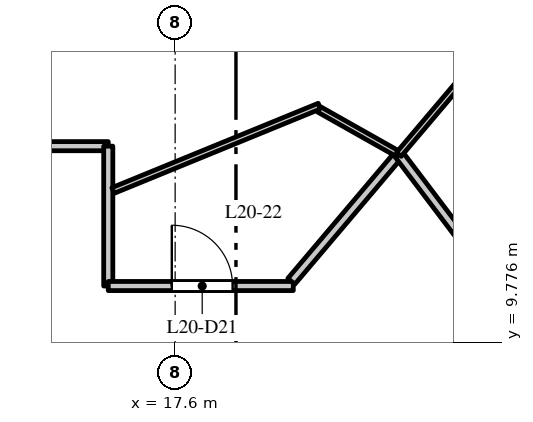
"""IFC4 building model, lengths in metres.
Left out: names, types, materials, properties, quantities, classifications, styles, units other than length and angle.
Written with IfcOpenShell. Run it as: python <this file> out.ifc"""

import sys

from ifc_helpers import new_model, si_unit, direction, frame, frame_2d, origin, place, context, subcontext, project, spatial, rectangle, extrude, element, fill, save


model = new_model("IFC4")
c1 = context("Model", 3, precision=1e-05, world=origin(), true_north=direction((0.0, 1.0)))
c2 = subcontext(c1, "Body", "Model", "MODEL_VIEW")
j1 = project(units=[si_unit("LENGTHUNIT", "METRE"), si_unit("PLANEANGLEUNIT", "RADIAN")], contexts=[c1])
p1 = place(None, origin())
s1 = spatial("IfcSite", under=j1, at=p1, CompositionType="ELEMENT")
p2 = place(p1, origin())
s2 = spatial("IfcBuilding", under=s1, at=p2, CompositionType="ELEMENT")
p3 = place(p2, frame((0.0, 0.0, 92.0)))
s3 = spatial("IfcBuildingStorey", under=s2, at=p3, CompositionType="ELEMENT", Elevation=92.0)
p4 = place(p3, frame((7.499, 13.0, 0.0), z_axis=(0.0, 0.0, 1.0), x_axis=(1.0, 0.0, 0.0)))
e1 = element("IfcWall", 1, at=p4, inside=s3, PredefinedType="PARTITIONING", context=c2, shape_type="SweptSolid", body=[
    extrude(rectangle(XDim=9.001, YDim=0.15, at=frame_2d((4.5, 0.0))), origin(), (0.0, 0.0, 1.0), 2.85),
])
p5 = place(p4, frame((4.101, 0.0, 0.0)))
e2 = element("IfcOpeningElement", 2, at=p5, cuts=e1, PredefinedType="OPENING", context=c2, shape_type="SweptSolid", body=[
    extrude(rectangle(XDim=1.0, YDim=2.1, at=frame_2d((0.5, 1.05))), frame((0.0, 0.085, 0.0), z_axis=(0.0, -1.0, 0.0), x_axis=(1.0, 0.0, 0.0)), (0.0, 0.0, 1.0), 0.17),
])
p6 = place(p3, frame((16.5, 10.7, 0.0), z_axis=(0.0, 0.0, 1.0), x_axis=(0.0, 1.0, 0.0)))
e3 = element("IfcWall", 3, at=p6, inside=s3, PredefinedType="PARTITIONING", context=c2, shape_type="SweptSolid", body=[
    extrude(rectangle(XDim=2.3, YDim=0.15, at=frame_2d((1.15, 0.0))), origin(), (0.0, 0.0, 1.0), 3.7),
])
p7 = place(p3, frame((16.5, 10.7, 0.0), z_axis=(0.0, 0.0, 1.0), x_axis=(1.0, 0.0, 0.0)))
e4 = element("IfcWall", 4, at=p7, inside=s3, PredefinedType="PARTITIONING", context=c2, shape_type="SweptSolid", body=[
    extrude(rectangle(XDim=3.043, YDim=0.15, at=frame_2d((1.521, 0.0))), origin(), (0.0, 0.0, 1.0), 3.7),
])
p8 = place(p7, frame((1.045, 0.0, 0.0)))
e5 = element("IfcOpeningElement", 5, at=p8, cuts=e4, PredefinedType="OPENING", context=c2, shape_type="SweptSolid", body=[
    extrude(rectangle(XDim=1.0, YDim=2.1, at=frame_2d((0.5, 1.05))), frame((0.0, 0.085, 0.0), z_axis=(0.0, -1.0, 0.0), x_axis=(1.0, 0.0, 0.0)), (0.0, 0.0, 1.0), 0.17),
])
p9 = place(p3, frame((16.579, 12.271, 0.0), z_axis=(0.0, 0.0, 1.0), x_axis=(0.925550138862, 0.378625065801, 0.0)))
e6 = element("IfcWall", 6, at=p9, inside=s3, PredefinedType="PARTITIONING", context=c2, shape_type="SweptSolid", body=[
    extrude(rectangle(XDim=3.666, YDim=0.1, at=frame_2d((1.833, 0.0))), origin(), (0.0, 0.0, 1.0), 3.7),
])
p10 = place(p3, frame((19.511, 10.778, 0.0), z_axis=(0.0, 0.0, 1.0), x_axis=(0.64641426768, 0.762986628021, 0.0)))
e7 = element("IfcWall", 7, at=p10, inside=s3, PredefinedType="PARTITIONING", context=c2, shape_type="SweptSolid", body=[
    extrude(rectangle(XDim=2.735, YDim=0.15, at=frame_2d((1.368, 0.0))), origin(), (0.0, 0.0, 1.0), 3.7),
])
p11 = place(p3, frame((19.969, 13.604, 0.0), z_axis=(0.0, 0.0, 1.0), x_axis=(0.870976686736, -0.491324344158, 0.0)))
e8 = element("IfcWall", 8, at=p11, inside=s3, PredefinedType="PARTITIONING", context=c2, shape_type="SweptSolid", body=[
    extrude(rectangle(XDim=1.504, YDim=0.1, at=frame_2d((0.752, 0.0))), origin(), (0.0, 0.0, 1.0), 3.7),
])
p12 = place(p3, frame((21.279, 12.865, 0.0), z_axis=(0.0, 0.0, 1.0), x_axis=(0.603433696796, -0.797413176196, 0.0)))
e9 = element("IfcWall", 9, at=p12, inside=s3, PredefinedType="PARTITIONING", context=c2, shape_type="SweptSolid", body=[
    extrude(rectangle(XDim=2.805, YDim=0.15, at=frame_2d((1.403, 0.0))), origin(), (0.0, 0.0, 1.0), 2.75),
])
p13 = place(p3, frame((21.279, 12.865, 0.0), z_axis=(0.0, 0.0, 1.0), x_axis=(0.646395355102, 0.763002650652, 0.0)))
e10 = element("IfcWall", 10, at=p13, inside=s3, PredefinedType="PARTITIONING", context=c2, shape_type="SweptSolid", body=[
    extrude(rectangle(XDim=7.969, YDim=0.1, at=frame_2d((3.984, 0.0))), origin(), (0.0, 0.0, 1.0), 2.9),
])
p14 = place(p8, origin())
e11 = element("IfcDoor", 11, at=p14, inside=s3, OperationType="SINGLE_SWING_LEFT", PredefinedType="DOOR", context=c2, shape_type="SweptSolid", body=[
    extrude(rectangle(XDim=1.0, YDim=2.1, at=frame_2d((0.5, 1.05))), frame((0.0, 0.025, 0.0), z_axis=(0.0, -1.0, 0.0), x_axis=(1.0, 0.0, 0.0)), (0.0, 0.0, 1.0), 0.05),
])
fill(e5, e11)
save(model, sys.argv[1])
